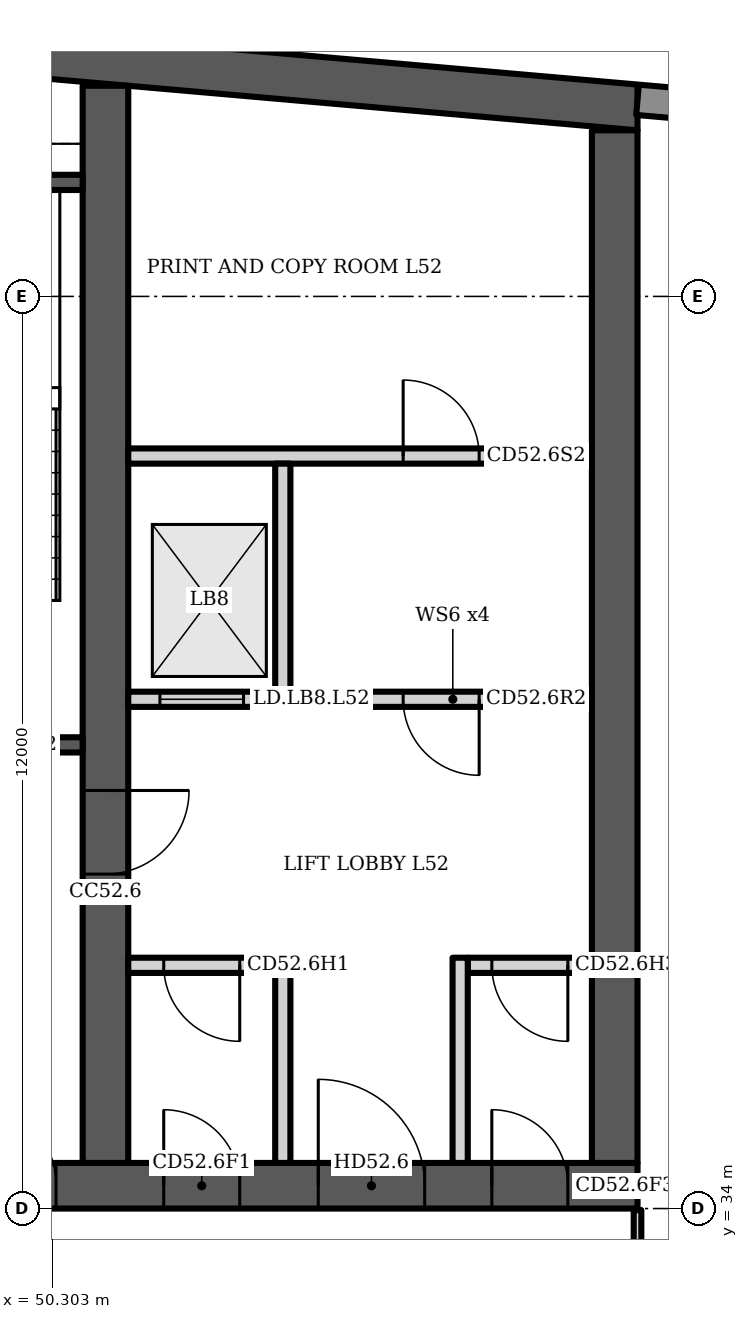
"""IFC4 building model, lengths in metres.
Left out: names, types, materials, properties, quantities, classifications, styles, units other than length and angle.
Written with IfcOpenShell. Run it as: python <this file> out.ifc"""

import sys

from ifc_helpers import new_model, si_unit, direction, frame, frame_2d, origin, place, context, subcontext, project, spatial, polyline, rectangle, outline, extrude, element, fill, save


model = new_model("IFC4")
c1 = context("Model", 3, precision=1e-05, world=origin(), true_north=direction((0.0, 1.0)))
c2 = subcontext(c1, "Body", "Model", "MODEL_VIEW")
j1 = project(units=[si_unit("LENGTHUNIT", "METRE"), si_unit("PLANEANGLEUNIT", "RADIAN")], contexts=[c1])
p1 = place(None, origin())
s1 = spatial("IfcSite", under=j1, at=p1, CompositionType="ELEMENT")
p2 = place(p1, origin())
s2 = spatial("IfcBuilding", under=s1, at=p2, CompositionType="ELEMENT")
p3 = place(p2, frame((0.0, 0.0, 210.7)))
s3 = spatial("IfcBuildingStorey", under=s2, at=p3, CompositionType="ELEMENT", Elevation=210.7)
p4 = place(p3, origin())
e1 = element("IfcWall", 1, at=p4, inside=s3, PredefinedType="SHEAR", context=c2, shape_type="SweptSolid", body=[
    extrude(outline(polyline([(23.0, 48.185), (40.5, 49.716), (58.0, 48.185), (58.0, 48.787), (40.5, 50.318), (23.0, 48.787), (23.0, 48.185)])), origin(), (0.0, 0.0, 1.0), 3.6),
])
p5 = place(p3, frame((23.0, 34.3, 0.0), z_axis=(0.0, 0.0, 1.0), x_axis=(1.0, 0.0, 0.0)))
e2 = element("IfcWall", 2, at=p5, inside=s3, PredefinedType="SHEAR", context=c2, shape_type="SweptSolid", body=[
    extrude(rectangle(XDim=35.0, YDim=0.6, at=frame_2d((17.5, 0.0))), origin(), (0.0, 0.0, 1.0), 3.6),
])
p6 = place(p5, frame((0.65, 0.0, 0.0)))
e3 = element("IfcOpeningElement", 3, at=p6, cuts=e2, PredefinedType="OPENING", context=c2, shape_type="SweptSolid", body=[
    extrude(rectangle(XDim=1.2, YDim=2.1, at=frame_2d((0.6, 1.05))), frame((0.0, 0.31, 0.0), z_axis=(0.0, -1.0, 0.0), x_axis=(1.0, 0.0, 0.0)), (0.0, 0.0, 1.0), 0.62),
])
p7 = place(p5, frame((7.717, 0.0, 0.0)))
e4 = element("IfcOpeningElement", 4, at=p7, cuts=e2, PredefinedType="OPENING", context=c2, shape_type="SweptSolid", body=[
    extrude(rectangle(XDim=1.1, YDim=2.1, at=frame_2d((0.55, 1.05))), frame((0.0, 0.31, 0.0), z_axis=(0.0, -1.0, 0.0), x_axis=(1.0, 0.0, 0.0)), (0.0, 0.0, 1.0), 0.62),
])
p8 = place(p5, frame((12.183, 0.0, 0.0)))
e5 = element("IfcOpeningElement", 5, at=p8, cuts=e2, PredefinedType="OPENING", context=c2, shape_type="SweptSolid", body=[
    extrude(rectangle(XDim=1.1, YDim=2.1, at=frame_2d((0.55, 1.05))), frame((0.0, 0.31, 0.0), z_axis=(0.0, -1.0, 0.0), x_axis=(1.0, 0.0, 0.0)), (0.0, 0.0, 1.0), 0.62),
])
p9 = place(p5, frame((9.8, 0.0, 0.0)))
e6 = element("IfcOpeningElement", 6, at=p9, cuts=e2, PredefinedType="OPENING", context=c2, shape_type="SweptSolid", body=[
    extrude(rectangle(XDim=1.4, YDim=2.1, at=frame_2d((0.7, 1.05))), frame((0.0, 0.31, 0.0), z_axis=(0.0, -1.0, 0.0), x_axis=(1.0, 0.0, 0.0)), (0.0, 0.0, 1.0), 0.62),
])
p10 = place(p5, frame((14.717, 0.0, 0.0)))
e7 = element("IfcOpeningElement", 7, at=p10, cuts=e2, PredefinedType="OPENING", context=c2, shape_type="SweptSolid", body=[
    extrude(rectangle(XDim=1.1, YDim=2.1, at=frame_2d((0.55, 1.05))), frame((0.0, 0.31, 0.0), z_axis=(0.0, -1.0, 0.0), x_axis=(1.0, 0.0, 0.0)), (0.0, 0.0, 1.0), 0.62),
])
p11 = place(p5, frame((16.95, 0.0, 0.0)))
e8 = element("IfcOpeningElement", 8, at=p11, cuts=e2, PredefinedType="OPENING", context=c2, shape_type="SweptSolid", body=[
    extrude(rectangle(XDim=1.1, YDim=2.1, at=frame_2d((0.55, 1.05))), frame((0.0, 0.31, 0.0), z_axis=(0.0, -1.0, 0.0), x_axis=(1.0, 0.0, 0.0)), (0.0, 0.0, 1.0), 0.62),
])
p12 = place(p5, frame((19.183, 0.0, 0.0)))
e9 = element("IfcOpeningElement", 9, at=p12, cuts=e2, PredefinedType="OPENING", context=c2, shape_type="SweptSolid", body=[
    extrude(rectangle(XDim=1.1, YDim=2.1, at=frame_2d((0.55, 1.05))), frame((0.0, 0.31, 0.0), z_axis=(0.0, -1.0, 0.0), x_axis=(1.0, 0.0, 0.0)), (0.0, 0.0, 1.0), 0.62),
])
p13 = place(p5, frame((26.15, 0.0, 0.0)))
e10 = element("IfcOpeningElement", 10, at=p13, cuts=e2, PredefinedType="OPENING", context=c2, shape_type="SweptSolid", body=[
    extrude(rectangle(XDim=1.2, YDim=2.1, at=frame_2d((0.6, 1.05))), frame((0.0, 0.31, 0.0), z_axis=(0.0, -1.0, 0.0), x_axis=(1.0, 0.0, 0.0)), (0.0, 0.0, 1.0), 0.62),
])
p14 = place(p5, frame((28.767, 0.0, 0.0)))
e11 = element("IfcOpeningElement", 11, at=p14, cuts=e2, PredefinedType="OPENING", context=c2, shape_type="SweptSolid", body=[
    extrude(rectangle(XDim=1.0, YDim=2.1, at=frame_2d((0.5, 1.05))), frame((0.0, 0.31, 0.0), z_axis=(0.0, -1.0, 0.0), x_axis=(1.0, 0.0, 0.0)), (0.0, 0.0, 1.0), 0.62),
])
p15 = place(p5, frame((33.083, 0.0, 0.0)))
e12 = element("IfcOpeningElement", 12, at=p15, cuts=e2, PredefinedType="OPENING", context=c2, shape_type="SweptSolid", body=[
    extrude(rectangle(XDim=1.0, YDim=2.1, at=frame_2d((0.5, 1.05))), frame((0.0, 0.31, 0.0), z_axis=(0.0, -1.0, 0.0), x_axis=(1.0, 0.0, 0.0)), (0.0, 0.0, 1.0), 0.62),
])
p16 = place(p5, frame((30.8, 0.0, 0.0)))
e13 = element("IfcOpeningElement", 13, at=p16, cuts=e2, PredefinedType="OPENING", context=c2, shape_type="SweptSolid", body=[
    extrude(rectangle(XDim=1.4, YDim=2.1, at=frame_2d((0.7, 1.05))), frame((0.0, 0.31, 0.0), z_axis=(0.0, -1.0, 0.0), x_axis=(1.0, 0.0, 0.0)), (0.0, 0.0, 1.0), 0.62),
])
p17 = place(p3, frame((51.0, 34.6, 0.0), z_axis=(0.0, 0.0, 1.0), x_axis=(0.0, 1.0, 0.0)))
e14 = element("IfcWall", 14, at=p17, inside=s3, PredefinedType="SHEAR", context=c2, shape_type="SweptSolid", body=[
    extrude(rectangle(XDim=14.171, YDim=0.6, at=frame_2d((7.085, 0.0))), origin(), (0.0, 0.0, 1.0), 3.6),
])
p18 = place(p17, frame((3.8, 0.0, 0.0)))
e15 = element("IfcOpeningElement", 15, at=p18, cuts=e14, PredefinedType="OPENING", context=c2, shape_type="SweptSolid", body=[
    extrude(rectangle(XDim=1.1, YDim=2.1, at=frame_2d((0.55, 1.05))), frame((0.0, 0.31, 0.0), z_axis=(0.0, -1.0, 0.0), x_axis=(1.0, 0.0, 0.0)), (0.0, 0.0, 1.0), 0.62),
])
p19 = place(p3, frame((57.7, 34.6, 0.0), z_axis=(0.0, 0.0, 1.0), x_axis=(0.0, 1.0, 0.0)))
e16 = element("IfcWall", 16, at=p19, inside=s3, PredefinedType="SHEAR", context=c2, shape_type="SweptSolid", body=[
    extrude(rectangle(XDim=13.585, YDim=0.6, at=frame_2d((6.792, 0.0))), origin(), (0.0, 0.0, 1.0), 3.6),
])
p20 = place(p3, frame((60.983, 48.326, 0.0), z_axis=(0.0, 0.0, 1.0), x_axis=(-0.996194, 0.087168, 0.0)))
e17 = element("IfcWall", 17, at=p20, inside=s3, PredefinedType="SOLIDWALL", context=c2, shape_type="SweptSolid", body=[
    extrude(rectangle(XDim=2.994, YDim=0.4, at=frame_2d((1.497, 0.0))), origin(), (0.0, 0.0, 1.0), 3.2),
])
p21 = place(p3, frame((44.3, 40.1, 0.0), z_axis=(0.0, 0.0, 1.0), x_axis=(1.0, 0.0, 0.0)))
e18 = element("IfcWall", 18, at=p21, inside=s3, PredefinedType="SHEAR", context=c2, shape_type="SweptSolid", body=[
    extrude(rectangle(XDim=6.4, YDim=0.2, at=frame_2d((3.2, 0.0))), origin(), (0.0, 0.0, 1.0), 3.2),
])
p22 = place(p21, frame((3.625, 0.0, 0.0)))
e19 = element("IfcOpeningElement", 19, at=p22, cuts=e18, PredefinedType="OPENING", context=c2, shape_type="SweptSolid", body=[
    extrude(rectangle(XDim=1.2, YDim=2.1, at=frame_2d((0.6, 1.05))), frame((0.0, 0.11, 0.0), z_axis=(0.0, -1.0, 0.0), x_axis=(1.0, 0.0, 0.0)), (0.0, 0.0, 1.0), 0.22),
])
p23 = place(p21, frame((0.625, 0.0, 0.0)))
e20 = element("IfcOpeningElement", 20, at=p23, cuts=e18, PredefinedType="OPENING", context=c2, shape_type="SweptSolid", body=[
    extrude(rectangle(XDim=0.9, YDim=2.1, at=frame_2d((0.45, 1.05))), frame((0.0, 0.11, 0.0), z_axis=(0.0, -1.0, 0.0), x_axis=(1.0, 0.0, 0.0)), (0.0, 0.0, 1.0), 0.22),
])
p24 = place(p3, frame((46.75, 47.5, 0.0), z_axis=(0.0, 0.0, 1.0), x_axis=(1.0, 0.0, 0.0)))
e21 = element("IfcWall", 21, at=p24, inside=s3, PredefinedType="SHEAR", context=c2, shape_type="SweptSolid", body=[
    extrude(rectangle(XDim=3.95, YDim=0.2, at=frame_2d((1.975, 0.0))), origin(), (0.0, 0.0, 1.0), 3.2),
])
p25 = place(p3, frame((51.3, 37.2, 0.0), z_axis=(0.0, 0.0, 1.0), x_axis=(1.0, 0.0, 0.0)))
e22 = element("IfcWall", 22, at=p25, inside=s3, PredefinedType="PARTITIONING", context=c2, shape_type="SweptSolid", body=[
    extrude(rectangle(XDim=1.933, YDim=0.2, at=frame_2d((0.967, 0.0))), origin(), (0.0, 0.0, 1.0), 3.2),
])
p26 = place(p25, frame((0.467, 0.0, 0.0)))
e23 = element("IfcOpeningElement", 23, at=p26, cuts=e22, PredefinedType="OPENING", context=c2, shape_type="SweptSolid", body=[
    extrude(rectangle(XDim=1.0, YDim=2.1, at=frame_2d((0.5, 1.05))), frame((0.0, 0.11, 0.0), z_axis=(0.0, -1.0, 0.0), x_axis=(1.0, 0.0, 0.0)), (0.0, 0.0, 1.0), 0.22),
])
p27 = place(p3, frame((55.767, 37.2, 0.0), z_axis=(0.0, 0.0, 1.0), x_axis=(1.0, 0.0, 0.0)))
e24 = element("IfcWall", 24, at=p27, inside=s3, PredefinedType="PARTITIONING", context=c2, shape_type="SweptSolid", body=[
    extrude(rectangle(XDim=1.633, YDim=0.2, at=frame_2d((0.817, 0.0))), origin(), (0.0, 0.0, 1.0), 3.2),
])
p28 = place(p27, frame((0.317, 0.0, 0.0)))
e25 = element("IfcOpeningElement", 25, at=p28, cuts=e24, PredefinedType="OPENING", context=c2, shape_type="SweptSolid", body=[
    extrude(rectangle(XDim=1.0, YDim=2.1, at=frame_2d((0.5, 1.05))), frame((0.0, 0.11, 0.0), z_axis=(0.0, -1.0, 0.0), x_axis=(1.0, 0.0, 0.0)), (0.0, 0.0, 1.0), 0.22),
])
p29 = place(p3, frame((51.3, 40.7, 0.0), z_axis=(0.0, 0.0, 1.0), x_axis=(1.0, 0.0, 0.0)))
e26 = element("IfcWall", 26, at=p29, inside=s3, PredefinedType="PARTITIONING", context=c2, shape_type="SweptSolid", body=[
    extrude(rectangle(XDim=6.1, YDim=0.2, at=frame_2d((3.05, 0.0))), origin(), (0.0, 0.0, 1.0), 3.2),
])
p30 = place(p29, frame((0.417, 0.0, 0.0)))
e27 = element("IfcOpeningElement", 27, at=p30, cuts=e26, PredefinedType="OPENING", context=c2, shape_type="SweptSolid", body=[
    extrude(rectangle(XDim=1.1, YDim=2.1, at=frame_2d((0.55, 1.05))), frame((0.0, 0.11, 0.0), z_axis=(0.0, -1.0, 0.0), x_axis=(1.0, 0.0, 0.0)), (0.0, 0.0, 1.0), 0.22),
])
p31 = place(p29, frame((3.617, 0.0, 0.0)))
e28 = element("IfcOpeningElement", 28, at=p31, cuts=e26, PredefinedType="OPENING", context=c2, shape_type="SweptSolid", body=[
    extrude(rectangle(XDim=1.0, YDim=2.1, at=frame_2d((0.5, 1.05))), frame((0.0, 0.11, 0.0), z_axis=(0.0, -1.0, 0.0), x_axis=(1.0, 0.0, 0.0)), (0.0, 0.0, 1.0), 0.22),
])
p32 = place(p3, frame((51.3, 43.9, 0.0), z_axis=(0.0, 0.0, 1.0), x_axis=(1.0, 0.0, 0.0)))
e29 = element("IfcWall", 29, at=p32, inside=s3, PredefinedType="PARTITIONING", context=c2, shape_type="SweptSolid", body=[
    extrude(rectangle(XDim=6.1, YDim=0.2, at=frame_2d((3.05, 0.0))), origin(), (0.0, 0.0, 1.0), 3.2),
])
p33 = place(p32, frame((3.617, 0.0, 0.0)))
e30 = element("IfcOpeningElement", 30, at=p33, cuts=e29, PredefinedType="OPENING", context=c2, shape_type="SweptSolid", body=[
    extrude(rectangle(XDim=1.0, YDim=2.1, at=frame_2d((0.5, 1.05))), frame((0.0, 0.11, 0.0), z_axis=(0.0, -1.0, 0.0), x_axis=(1.0, 0.0, 0.0)), (0.0, 0.0, 1.0), 0.22),
])
p34 = place(p3, frame((0.0, 0.0, -0.0)))
e31 = element("IfcWall", 31, at=p34, inside=s3, PredefinedType="PARTITIONING", context=c2, shape_type="SweptSolid", body=[
    extrude(outline(polyline([(53.233, 34.6), (53.233, 37.3), (53.433, 37.3), (53.433, 34.6), (53.233, 34.6)])), origin(), (0.0, 0.0, 1.0), 3.2),
])
p35 = place(p3, frame((0.0, 0.0, -0.0)))
e32 = element("IfcWall", 32, at=p35, inside=s3, PredefinedType="PARTITIONING", context=c2, shape_type="SweptSolid", body=[
    extrude(outline(polyline([(55.567, 34.6), (55.567, 37.3), (55.767, 37.3), (55.767, 34.6), (55.567, 34.6)])), origin(), (0.0, 0.0, 1.0), 3.2),
])
p36 = place(p3, frame((0.0, 0.0, -0.0)))
e33 = element("IfcWall", 33, at=p36, inside=s3, PredefinedType="PARTITIONING", context=c2, shape_type="SweptSolid", body=[
    extrude(outline(polyline([(53.433, 40.8), (53.433, 43.8), (53.233, 43.8), (53.233, 40.8), (53.433, 40.8)])), origin(), (0.0, 0.0, 1.0), 3.2),
])
p37 = place(p3, frame((58.0, 30.5, 0.0), z_axis=(0.0, 0.0, 1.0), x_axis=(0.0, 1.0, 0.0)))
e34 = element("IfcWall", 34, at=p37, inside=s3, PredefinedType="PARTITIONING", context=c2, shape_type="SweptSolid", body=[
    extrude(rectangle(XDim=3.48, YDim=0.1, at=frame_2d((1.74, 0.0))), origin(), (0.0, 0.0, 1.0), 3.2),
])
p38 = place(p13, origin())
e35 = element("IfcDoor", 35, at=p38, inside=s3, OperationType="SINGLE_SWING_LEFT", PredefinedType="DOOR", context=c2, shape_type="SweptSolid", body=[
    extrude(rectangle(XDim=1.2, YDim=2.1, at=frame_2d((0.6, 1.05))), frame((0.0, 0.025, 0.0), z_axis=(0.0, -1.0, 0.0), x_axis=(1.0, 0.0, 0.0)), (0.0, 0.0, 1.0), 0.05),
])
fill(e10, e35)
p39 = place(p14, origin())
e36 = element("IfcDoor", 36, at=p39, inside=s3, OperationType="SINGLE_SWING_LEFT", PredefinedType="DOOR", context=c2, shape_type="SweptSolid", body=[
    extrude(rectangle(XDim=1.0, YDim=2.1, at=frame_2d((0.5, 1.05))), frame((0.0, 0.025, 0.0), z_axis=(0.0, -1.0, 0.0), x_axis=(1.0, 0.0, 0.0)), (0.0, 0.0, 1.0), 0.05),
])
fill(e11, e36)
p40 = place(p26, origin())
e37 = element("IfcDoor", 37, at=p40, inside=s3, OperationType="SINGLE_SWING_RIGHT", PredefinedType="DOOR", context=c2, shape_type="SweptSolid", body=[
    extrude(rectangle(XDim=1.0, YDim=2.1, at=frame_2d((0.5, 1.05))), frame((0.0, 0.025, 0.0), z_axis=(0.0, -1.0, 0.0), x_axis=(1.0, 0.0, 0.0)), (0.0, 0.0, 1.0), 0.05),
])
fill(e23, e37)
p41 = place(p15, origin())
e38 = element("IfcDoor", 38, at=p41, inside=s3, OperationType="SINGLE_SWING_LEFT", PredefinedType="DOOR", context=c2, shape_type="SweptSolid", body=[
    extrude(rectangle(XDim=1.0, YDim=2.1, at=frame_2d((0.5, 1.05))), frame((0.0, 0.025, 0.0), z_axis=(0.0, -1.0, 0.0), x_axis=(1.0, 0.0, 0.0)), (0.0, 0.0, 1.0), 0.05),
])
fill(e12, e38)
p42 = place(p28, origin())
e39 = element("IfcDoor", 39, at=p42, inside=s3, OperationType="SINGLE_SWING_RIGHT", PredefinedType="DOOR", context=c2, shape_type="SweptSolid", body=[
    extrude(rectangle(XDim=1.0, YDim=2.1, at=frame_2d((0.5, 1.05))), frame((0.0, 0.025, 0.0), z_axis=(0.0, -1.0, 0.0), x_axis=(1.0, 0.0, 0.0)), (0.0, 0.0, 1.0), 0.05),
])
fill(e25, e39)
p43 = place(p16, origin())
e40 = element("IfcDoor", 40, at=p43, inside=s3, OperationType="DOUBLE_DOOR_SINGLE_SWING", PredefinedType="DOOR", context=c2, shape_type="SweptSolid", body=[
    extrude(rectangle(XDim=1.4, YDim=2.1, at=frame_2d((0.7, 1.05))), frame((0.0, 0.025, 0.0), z_axis=(0.0, -1.0, 0.0), x_axis=(1.0, 0.0, 0.0)), (0.0, 0.0, 1.0), 0.05),
])
fill(e13, e40)
p44 = place(p30, origin())
e41 = element("IfcDoor", 41, at=p44, inside=s3, OperationType="DOUBLE_DOOR_SLIDING", PredefinedType="DOOR", context=c2, shape_type="SweptSolid", body=[
    extrude(rectangle(XDim=1.1, YDim=2.1, at=frame_2d((0.55, 1.05))), frame((0.0, 0.025, 0.0), z_axis=(0.0, -1.0, 0.0), x_axis=(1.0, 0.0, 0.0)), (0.0, 0.0, 1.0), 0.05),
])
fill(e27, e41)
p45 = place(p31, origin())
e42 = element("IfcDoor", 42, at=p45, inside=s3, OperationType="SINGLE_SWING_RIGHT", PredefinedType="DOOR", context=c2, shape_type="SweptSolid", body=[
    extrude(rectangle(XDim=1.0, YDim=2.1, at=frame_2d((0.5, 1.05))), frame((0.0, 0.025, 0.0), z_axis=(0.0, -1.0, 0.0), x_axis=(1.0, 0.0, 0.0)), (0.0, 0.0, 1.0), 0.05),
])
fill(e28, e42)
p46 = place(p33, origin())
e43 = element("IfcDoor", 43, at=p46, inside=s3, OperationType="SINGLE_SWING_LEFT", PredefinedType="DOOR", context=c2, shape_type="SweptSolid", body=[
    extrude(rectangle(XDim=1.0, YDim=2.1, at=frame_2d((0.5, 1.05))), frame((0.0, 0.025, 0.0), z_axis=(0.0, -1.0, 0.0), x_axis=(1.0, 0.0, 0.0)), (0.0, 0.0, 1.0), 0.05),
])
fill(e30, e43)
p47 = place(p18, origin())
e44 = element("IfcDoor", 44, at=p47, inside=s3, OperationType="SINGLE_SWING_RIGHT", PredefinedType="DOOR", context=c2, shape_type="SweptSolid", body=[
    extrude(rectangle(XDim=1.1, YDim=2.1, at=frame_2d((0.55, 1.05))), frame((0.0, 0.025, 0.0), z_axis=(0.0, -1.0, 0.0), x_axis=(1.0, 0.0, 0.0)), (0.0, 0.0, 1.0), 0.05),
])
fill(e15, e44)
save(model, sys.argv[1])
